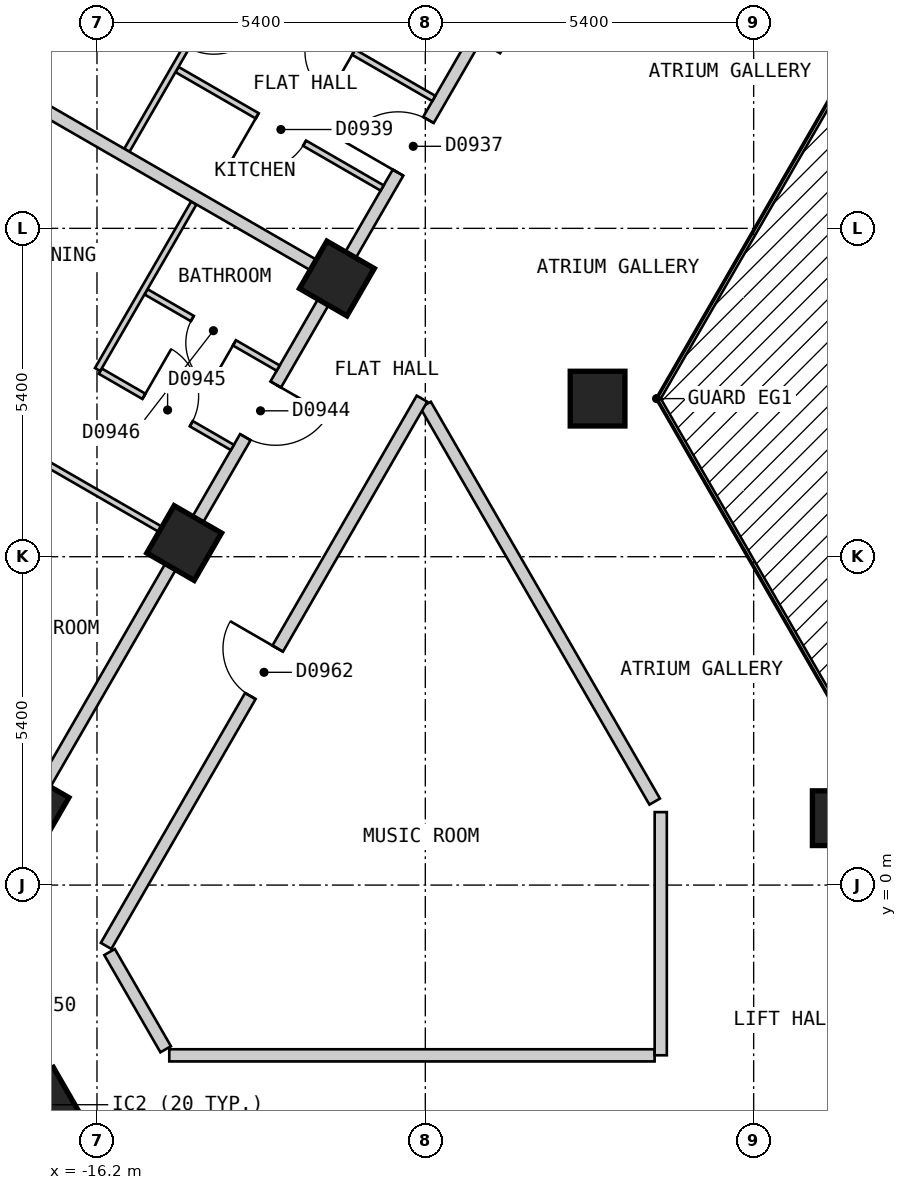
"""IFC4 building model, lengths in metres.
Left out: names, types, materials, properties, quantities, classifications, styles, units other than length and angle.
Written with IfcOpenShell. Run it as: python <this file> out.ifc"""

import sys

from ifc_helpers import new_model, si_unit, direction, frame, frame_2d, origin, origin_2d, place, context, subcontext, project, spatial, polyline, rectangle, outline, extrude, element, fill, save


model = new_model("IFC4")
c1 = context("Model", 3, precision=1e-05, world=origin(), true_north=direction((0.0, 1.0)))
c2 = subcontext(c1, "Body", "Model", "MODEL_VIEW")
j1 = project(units=[si_unit("LENGTHUNIT", "METRE"), si_unit("PLANEANGLEUNIT", "RADIAN")], contexts=[c1])
p1 = place(None, origin())
s1 = spatial("IfcSite", under=j1, at=p1, CompositionType="ELEMENT")
p2 = place(p1, origin())
s2 = spatial("IfcBuilding", under=s1, at=p2, CompositionType="ELEMENT")
p3 = place(p2, frame((0.0, 0.0, 90.0)))
s3 = spatial("IfcBuildingStorey", under=s2, at=p3, CompositionType="ELEMENT", Elevation=90.0)
for number, where, z_axis, x_axis in (
    (1, (-17.083, -3.612, 0.0), (0.0, 0.0, 1.0), (0.5, -0.866, 0.0)),
    (2, (-7.967, 8.0, 0.0), (0.0, 0.0, 1.0), (1.0, 0.0, 0.0)),
    (3, (-12.254, 9.975, 0.0), (0.0, 0.0, 1.0), (-0.5, -0.866, 0.0)),
    (4, (-14.766, 5.625, 0.0), (0.0, 0.0, 1.0), (-0.5, -0.866, 0.0)),
    (5, (-3.984, 1.1, 0.0), (0.0, 0.0, 1.0), (1.0, 0.0, 0.0)),
    (6, (-17.277, 1.275, 0.0), (0.0, 0.0, 1.0), (-0.5, -0.866, 0.0)),
):
    element("IfcColumn", number, at=place(p3, frame(where, z_axis=z_axis, x_axis=x_axis)), inside=s3, PredefinedType="COLUMN", context=c2, shape_type="SweptSolid", body=[
        extrude(rectangle(XDim=0.9, YDim=0.9, at=origin_2d()), origin(), (0.0, 0.0, 1.0), 3.0),
    ])
p4 = place(p3, frame((-15.747, 24.425, 0.0), z_axis=(0.0, 0.0, 1.0), x_axis=(-0.500027479704, -0.866009537788, 0.0)))
e7 = element("IfcWall", 7, at=p4, inside=s3, PredefinedType="SOLIDWALL", context=c2, shape_type="SweptSolid", body=[
    extrude(outline(polyline([(0.0, -0.15), (26.559, -0.15), (26.478, 0.15), (0.08, 0.15), (0.0, -0.15)])), origin(), (0.0, 0.0, 1.0), 2.7),
])
p5 = place(p4, frame((2.483, 0.0, 0.15)))
e8 = element("IfcOpeningElement", 8, at=p5, cuts=e7, PredefinedType="OPENING", context=c2, shape_type="SweptSolid", body=[
    extrude(rectangle(XDim=1.5, YDim=2.1, at=frame_2d((0.75, 1.05))), frame((0.0, 0.16, 0.0), z_axis=(0.0, -1.0, 0.0), x_axis=(1.0, 0.0, 0.0)), (0.0, 0.0, 1.0), 0.32),
])
p6 = place(p4, frame((7.506, 0.0, 0.15)))
e9 = element("IfcOpeningElement", 9, at=p6, cuts=e7, PredefinedType="OPENING", context=c2, shape_type="SweptSolid", body=[
    extrude(rectangle(XDim=1.5, YDim=2.1, at=frame_2d((0.75, 1.05))), frame((0.0, 0.16, 0.0), z_axis=(0.0, -1.0, 0.0), x_axis=(1.0, 0.0, 0.0)), (0.0, 0.0, 1.0), 0.32),
])
p7 = place(p4, frame((12.529, 0.0, 0.15)))
e10 = element("IfcOpeningElement", 10, at=p7, cuts=e7, PredefinedType="OPENING", context=c2, shape_type="SweptSolid", body=[
    extrude(rectangle(XDim=1.5, YDim=2.1, at=frame_2d((0.75, 1.05))), frame((0.0, 0.16, 0.0), z_axis=(0.0, -1.0, 0.0), x_axis=(1.0, 0.0, 0.0)), (0.0, 0.0, 1.0), 0.32),
])
p8 = place(p4, frame((17.552, 0.0, 0.15)))
e11 = element("IfcOpeningElement", 11, at=p8, cuts=e7, PredefinedType="OPENING", context=c2, shape_type="SweptSolid", body=[
    extrude(rectangle(XDim=1.5, YDim=2.1, at=frame_2d((0.75, 1.05))), frame((0.0, 0.16, 0.0), z_axis=(0.0, -1.0, 0.0), x_axis=(1.0, 0.0, 0.0)), (0.0, 0.0, 1.0), 0.32),
])
p9 = place(p4, frame((22.575, 0.0, 0.15)))
e12 = element("IfcOpeningElement", 12, at=p9, cuts=e7, PredefinedType="OPENING", context=c2, shape_type="SweptSolid", body=[
    extrude(rectangle(XDim=1.5, YDim=2.1, at=frame_2d((0.75, 1.05))), frame((0.0, 0.16, 0.0), z_axis=(0.0, -1.0, 0.0), x_axis=(1.0, 0.0, 0.0)), (0.0, 0.0, 1.0), 0.32),
])
p10 = place(p3, frame((-10.796, 7.899, 0.0), z_axis=(0.0, 0.0, 1.0), x_axis=(0.500010383074, -0.866019409031, 0.0)))
e13 = element("IfcWall", 13, at=p10, inside=s3, PredefinedType="PARTITIONING", context=c2, shape_type="SweptSolid", body=[
    extrude(rectangle(XDim=7.535, YDim=0.2, at=frame_2d((3.768, 0.0))), origin(), (0.0, 0.0, 1.0), 2.7),
])
p11 = place(p3, frame((-15.993, -1.101, 0.0), z_axis=(0.0, 0.0, 1.0), x_axis=(0.499894174133, -0.866086493757, 0.0)))
e14 = element("IfcWall", 14, at=p11, inside=s3, PredefinedType="PARTITIONING", context=c2, shape_type="SweptSolid", body=[
    extrude(rectangle(XDim=1.846, YDim=0.2, at=frame_2d((0.923, 0.0))), origin(), (0.0, 0.0, 1.0), 2.7),
])
p12 = place(p3, frame((-18.533, -1.101, 0.0), z_axis=(0.0, 0.0, 1.0), x_axis=(0.500022085096, -0.866012652573, 0.0)))
e15 = element("IfcWall", 15, at=p12, inside=s3, PredefinedType="PARTITIONING", context=c2, shape_type="SweptSolid", body=[
    extrude(rectangle(XDim=6.066, YDim=0.2, at=frame_2d((3.033, 0.0))), origin(), (0.0, 0.0, 1.0), 2.7),
])
p13 = place(p12, frame((0.532, 0.0, 0.0)))
e16 = element("IfcOpeningElement", 16, at=p13, cuts=e15, PredefinedType="OPENING", context=c2, shape_type="SweptSolid", body=[
    extrude(rectangle(XDim=1.0, YDim=2.1, at=frame_2d((0.5, 1.05))), frame((0.0, 0.11, 0.0), z_axis=(0.0, -1.0, 0.0), x_axis=(1.0, 0.0, 0.0)), (0.0, 0.0, 1.0), 0.22),
])
p14 = place(p3, frame((-15.011, -2.8, 0.0), z_axis=(0.0, 0.0, 1.0), x_axis=(1.0, 0.0, 0.0)))
e17 = element("IfcWall", 17, at=p14, inside=s3, PredefinedType="PARTITIONING", context=c2, shape_type="SweptSolid", body=[
    extrude(rectangle(XDim=7.982, YDim=0.2, at=frame_2d((3.991, 0.0))), origin(), (0.0, 0.0, 1.0), 2.7),
])
p15 = place(p3, frame((-16.05, -1.0, 0.0), z_axis=(0.0, 0.0, 1.0), x_axis=(0.499962449088, 0.866047082728, 0.0)))
e18 = element("IfcWall", 18, at=p15, inside=s3, PredefinedType="PARTITIONING", context=c2, shape_type="SweptSolid", body=[
    extrude(rectangle(XDim=10.391, YDim=0.2, at=frame_2d((5.195, 0.0))), origin(), (0.0, 0.0, 1.0), 2.7),
])
p16 = place(p15, frame((4.745, 0.0, 0.0)))
e19 = element("IfcOpeningElement", 19, at=p16, cuts=e18, PredefinedType="OPENING", context=c2, shape_type="SweptSolid", body=[
    extrude(rectangle(XDim=0.9, YDim=2.1, at=frame_2d((0.45, 1.05))), frame((0.0, 0.11, 0.0), z_axis=(0.0, -1.0, 0.0), x_axis=(1.0, 0.0, 0.0)), (0.0, 0.0, 1.0), 0.22),
])
p17 = place(p3, frame((-18.562, -0.951, 0.0), z_axis=(0.0, 0.0, 1.0), x_axis=(0.499987097491, 0.866032852923, 0.0)))
e20 = element("IfcWall", 20, at=p17, inside=s3, PredefinedType="PARTITIONING", context=c2, shape_type="SweptSolid", body=[
    extrude(rectangle(XDim=20.15, YDim=0.2, at=frame_2d((10.075, 0.0))), origin(), (0.0, 0.0, 1.0), 2.7),
])
p18 = place(p17, frame((14.627, 0.0, 0.0)))
e21 = element("IfcOpeningElement", 21, at=p18, cuts=e20, PredefinedType="OPENING", context=c2, shape_type="SweptSolid", body=[
    extrude(rectangle(XDim=1.0, YDim=2.1, at=frame_2d((0.5, 1.05))), frame((0.0, 0.11, 0.0), z_axis=(0.0, -1.0, 0.0), x_axis=(1.0, 0.0, 0.0)), (0.0, 0.0, 1.0), 0.22),
])
p19 = place(p17, frame((9.604, 0.0, 0.0)))
e22 = element("IfcOpeningElement", 22, at=p19, cuts=e20, PredefinedType="OPENING", context=c2, shape_type="SweptSolid", body=[
    extrude(rectangle(XDim=1.0, YDim=2.1, at=frame_2d((0.5, 1.05))), frame((0.0, 0.11, 0.0), z_axis=(0.0, -1.0, 0.0), x_axis=(1.0, 0.0, 0.0)), (0.0, 0.0, 1.0), 0.22),
])
p20 = place(p3, frame((-6.928, -2.799, 0.0), z_axis=(0.0, 0.0, 1.0), x_axis=(0.0, 1.0, 0.0)))
e23 = element("IfcWall", 23, at=p20, inside=s3, PredefinedType="PARTITIONING", context=c2, shape_type="SweptSolid", body=[
    extrude(rectangle(XDim=3.999, YDim=0.2, at=frame_2d((2.0, 0.0))), origin(), (0.0, 0.0, 1.0), 2.7),
])
p21 = place(p3, frame((-16.146, 8.452, 0.0), z_axis=(0.0, 0.0, 1.0), x_axis=(0.865983051302, -0.500073349477, 0.0)))
e24 = element("IfcWall", 24, at=p21, inside=s3, PredefinedType="PARTITIONING", context=c2, shape_type="SweptSolid", body=[
    extrude(rectangle(XDim=2.509, YDim=0.1, at=frame_2d((1.255, 0.0))), origin(), (0.0, 0.0, 1.0), 2.7),
])
p22 = place(p21, frame((0.829, 0.0, 0.0)))
e25 = element("IfcOpeningElement", 25, at=p22, cuts=e24, PredefinedType="OPENING", context=c2, shape_type="SweptSolid", body=[
    extrude(rectangle(XDim=0.9, YDim=2.1, at=frame_2d((0.45, 1.05))), frame((0.0, 0.06, 0.0), z_axis=(0.0, -1.0, 0.0), x_axis=(1.0, 0.0, 0.0)), (0.0, 0.0, 1.0), 0.12),
])
p23 = place(p3, frame((-23.513, 10.675, 0.0), z_axis=(0.0, 0.0, 1.0), x_axis=(0.866041268327, -0.499972520799, 0.0)))
e26 = element("IfcWall", 26, at=p23, inside=s3, PredefinedType="PARTITIONING", context=c2, shape_type="SweptSolid", body=[
    extrude(rectangle(XDim=10.0, YDim=0.1, at=frame_2d((5.0, 0.0))), origin(), (0.0, 0.0, 1.0), 2.7),
])
p24 = place(p23, frame((4.325, 0.0, 0.0)))
e27 = element("IfcOpeningElement", 27, at=p24, cuts=e26, PredefinedType="OPENING", context=c2, shape_type="SweptSolid", body=[
    extrude(rectangle(XDim=0.9, YDim=2.1, at=frame_2d((0.45, 1.05))), frame((0.0, 0.06, 0.0), z_axis=(0.0, -1.0, 0.0), x_axis=(1.0, 0.0, 0.0)), (0.0, 0.0, 1.0), 0.12),
])
p25 = place(p3, frame((-14.884, 13.412, 0.0), z_axis=(0.0, 0.0, 1.0), x_axis=(0.866024880635, -0.500000906121, 0.0)))
e28 = element("IfcWall", 28, at=p25, inside=s3, PredefinedType="PARTITIONING", context=c2, shape_type="SweptSolid", body=[
    extrude(rectangle(XDim=3.896, YDim=0.1, at=frame_2d((1.948, 0.0))), origin(), (0.0, 0.0, 1.0), 2.7),
])
p26 = place(p25, frame((1.523, 0.0, 0.0)))
e29 = element("IfcOpeningElement", 29, at=p26, cuts=e28, PredefinedType="OPENING", context=c2, shape_type="SweptSolid", body=[
    extrude(rectangle(XDim=0.9, YDim=2.1, at=frame_2d((0.45, 1.05))), frame((0.0, 0.06, 0.0), z_axis=(0.0, -1.0, 0.0), x_axis=(1.0, 0.0, 0.0)), (0.0, 0.0, 1.0), 0.12),
])
p27 = place(p3, frame((-14.034, 14.884, 0.0), z_axis=(0.0, 0.0, 1.0), x_axis=(0.866024880635, -0.500000906121, 0.0)))
e30 = element("IfcWall", 30, at=p27, inside=s3, PredefinedType="PARTITIONING", context=c2, shape_type="SweptSolid", body=[
    extrude(rectangle(XDim=3.896, YDim=0.1, at=frame_2d((1.948, 0.0))), origin(), (0.0, 0.0, 1.0), 2.7),
])
p28 = place(p27, frame((1.573, 0.0, 0.0)))
e31 = element("IfcOpeningElement", 31, at=p28, cuts=e30, PredefinedType="OPENING", context=c2, shape_type="SweptSolid", body=[
    extrude(rectangle(XDim=0.8, YDim=2.1, at=frame_2d((0.4, 1.05))), frame((0.0, 0.06, 0.0), z_axis=(0.0, -1.0, 0.0), x_axis=(1.0, 0.0, 0.0)), (0.0, 0.0, 1.0), 0.12),
])
p29 = place(p3, frame((-15.394, 9.757, 0.0), z_axis=(0.0, 0.0, 1.0), x_axis=(0.866038211682, -0.499977815414, 0.0)))
e32 = element("IfcWall", 32, at=p29, inside=s3, PredefinedType="PARTITIONING", context=c2, shape_type="SweptSolid", body=[
    extrude(rectangle(XDim=2.51, YDim=0.1, at=frame_2d((1.255, 0.0))), origin(), (0.0, 0.0, 1.0), 2.7),
])
p30 = place(p29, frame((0.88, 0.0, 0.0)))
e33 = element("IfcOpeningElement", 33, at=p30, cuts=e32, PredefinedType="OPENING", context=c2, shape_type="SweptSolid", body=[
    extrude(rectangle(XDim=0.8, YDim=2.1, at=frame_2d((0.4, 1.05))), frame((0.0, 0.06, 0.0), z_axis=(0.0, -1.0, 0.0), x_axis=(1.0, 0.0, 0.0)), (0.0, 0.0, 1.0), 0.12),
])
p31 = place(p3, frame((-16.19, 8.478, 0.0), z_axis=(0.0, 0.0, 1.0), x_axis=(0.500156715107, 0.865934905367, 0.0)))
e34 = element("IfcWall", 34, at=p31, inside=s3, PredefinedType="PARTITIONING", context=c2, shape_type="SweptSolid", body=[
    extrude(rectangle(XDim=3.163, YDim=0.1, at=frame_2d((1.582, 0.0))), origin(), (0.0, 0.0, 1.0), 2.7),
])
p32 = place(p3, frame((-15.708, 12.085, 0.0), z_axis=(0.0, 0.0, 1.0), x_axis=(0.499943653708, 0.866057932887, 0.0)))
e35 = element("IfcWall", 35, at=p32, inside=s3, PredefinedType="PARTITIONING", context=c2, shape_type="SweptSolid", body=[
    extrude(rectangle(XDim=4.873, YDim=0.1, at=frame_2d((2.436, 0.0))), origin(), (0.0, 0.0, 1.0), 2.7),
])
p33 = place(p32, frame((1.962, 0.0, 0.0)))
e36 = element("IfcOpeningElement", 36, at=p33, cuts=e35, PredefinedType="OPENING", context=c2, shape_type="SweptSolid", body=[
    extrude(rectangle(XDim=0.9, YDim=2.1, at=frame_2d((0.45, 1.05))), frame((0.0, 0.06, 0.0), z_axis=(0.0, -1.0, 0.0), x_axis=(1.0, 0.0, 0.0)), (0.0, 0.0, 1.0), 0.12),
])
p34 = place(p3, frame((-21.001, 15.025, 0.0), z_axis=(0.0, 0.0, 1.0), x_axis=(0.866016855193, -0.500014806302, 0.0)))
e37 = element("IfcWall", 37, at=p34, inside=s3, PredefinedType="PARTITIONING", context=c2, shape_type="SweptSolid", body=[
    extrude(rectangle(XDim=10.0, YDim=0.2, at=frame_2d((5.0, 0.0))), origin(), (0.0, 0.0, 1.0), 2.7),
])
p35 = place(p18, origin())
e38 = element("IfcDoor", 38, at=p35, inside=s3, OperationType="SINGLE_SWING_LEFT", PredefinedType="DOOR", context=c2, shape_type="SweptSolid", body=[
    extrude(rectangle(XDim=1.0, YDim=2.1, at=frame_2d((0.5, 1.05))), frame((0.0, 0.025, 0.0), z_axis=(0.0, -1.0, 0.0), x_axis=(1.0, 0.0, 0.0)), (0.0, 0.0, 1.0), 0.05),
])
fill(e21, e38)
p36 = place(p28, origin())
e39 = element("IfcDoor", 39, at=p36, inside=s3, OperationType="SINGLE_SWING_RIGHT", PredefinedType="DOOR", context=c2, shape_type="SweptSolid", body=[
    extrude(rectangle(XDim=0.8, YDim=2.1, at=frame_2d((0.4, 1.05))), frame((0.0, 0.025, 0.0), z_axis=(0.0, -1.0, 0.0), x_axis=(1.0, 0.0, 0.0)), (0.0, 0.0, 1.0), 0.05),
])
fill(e31, e39)
p37 = place(p26, origin())
e40 = element("IfcDoor", 40, at=p37, inside=s3, OperationType="SINGLE_SWING_LEFT", PredefinedType="DOOR", context=c2, shape_type="SweptSolid", body=[
    extrude(rectangle(XDim=0.9, YDim=2.1, at=frame_2d((0.45, 1.05))), frame((0.0, 0.025, 0.0), z_axis=(0.0, -1.0, 0.0), x_axis=(1.0, 0.0, 0.0)), (0.0, 0.0, 1.0), 0.05),
])
fill(e29, e40)
p38 = place(p19, origin())
e41 = element("IfcDoor", 41, at=p38, inside=s3, OperationType="SINGLE_SWING_RIGHT", PredefinedType="DOOR", context=c2, shape_type="SweptSolid", body=[
    extrude(rectangle(XDim=1.0, YDim=2.1, at=frame_2d((0.5, 1.05))), frame((0.0, 0.025, 0.0), z_axis=(0.0, -1.0, 0.0), x_axis=(1.0, 0.0, 0.0)), (0.0, 0.0, 1.0), 0.05),
])
fill(e22, e41)
p39 = place(p22, origin())
e42 = element("IfcDoor", 42, at=p39, inside=s3, OperationType="SINGLE_SWING_LEFT", PredefinedType="DOOR", context=c2, shape_type="SweptSolid", body=[
    extrude(rectangle(XDim=0.9, YDim=2.1, at=frame_2d((0.45, 1.05))), frame((0.0, 0.025, 0.0), z_axis=(0.0, -1.0, 0.0), x_axis=(1.0, 0.0, 0.0)), (0.0, 0.0, 1.0), 0.05),
])
fill(e25, e42)
p40 = place(p30, origin())
e43 = element("IfcDoor", 43, at=p40, inside=s3, OperationType="SINGLE_SWING_RIGHT", PredefinedType="DOOR", context=c2, shape_type="SweptSolid", body=[
    extrude(rectangle(XDim=0.8, YDim=2.1, at=frame_2d((0.4, 1.05))), frame((0.0, 0.025, 0.0), z_axis=(0.0, -1.0, 0.0), x_axis=(1.0, 0.0, 0.0)), (0.0, 0.0, 1.0), 0.05),
])
fill(e33, e43)
p41 = place(p16, origin())
e44 = element("IfcDoor", 44, at=p41, inside=s3, OperationType="SINGLE_SWING_RIGHT", PredefinedType="DOOR", context=c2, shape_type="SweptSolid", body=[
    extrude(rectangle(XDim=0.9, YDim=2.1, at=frame_2d((0.45, 1.05))), frame((0.0, 0.025, 0.0), z_axis=(0.0, -1.0, 0.0), x_axis=(1.0, 0.0, 0.0)), (0.0, 0.0, 1.0), 0.05),
])
fill(e19, e44)
save(model, sys.argv[1])
